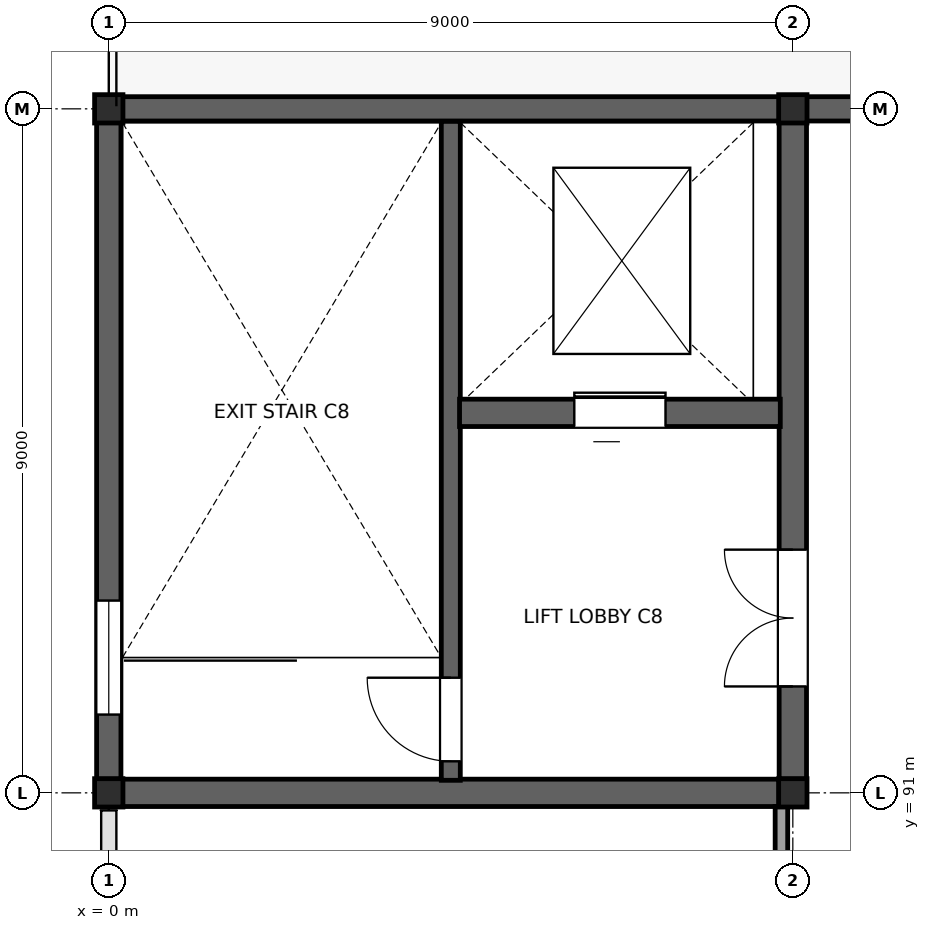
"""IFC4 building model, lengths in metres.
Left out: names, types, materials, properties, quantities, classifications, styles, units other than length and angle.
Written with IfcOpenShell. Run it as: python <this file> out.ifc"""

import sys

from ifc_helpers import new_model, si_unit, direction, frame, frame_2d, origin, origin_2d, place, context, subcontext, project, spatial, rectangle, i_section, extrude, element, fill, save


model = new_model("IFC4")
c1 = context("Model", 3, precision=1e-05, world=origin(), true_north=direction((0.0, 1.0)))
c2 = subcontext(c1, "Body", "Model", "MODEL_VIEW")
j1 = project(units=[si_unit("LENGTHUNIT", "METRE"), si_unit("PLANEANGLEUNIT", "RADIAN")], contexts=[c1])
p1 = place(None, origin())
s1 = spatial("IfcSite", under=j1, at=p1, CompositionType="ELEMENT")
p2 = place(p1, origin())
s2 = spatial("IfcBuilding", under=s1, at=p2, CompositionType="ELEMENT")
p3 = place(p2, frame((0.0, 0.0, 21.0)))
s3 = spatial("IfcBuildingStorey", under=s2, at=p3, CompositionType="ELEMENT", Elevation=21.0)
for number, where, z_axis, x_axis in (
    (1, (0.0, 91.0, 0.0), (0.0, 0.0, 1.0), (1.0, 0.0, 0.0)),
    (2, (0.0, 100.0, 0.0), (0.0, 0.0, 1.0), (1.0, 0.0, 0.0)),
    (3, (9.0, 91.0, 0.0), (0.0, 0.0, 1.0), (1.0, 0.0, 0.0)),
    (4, (9.0, 100.0, 0.0), (0.0, 0.0, 1.0), (1.0, 0.0, 0.0)),
):
    element("IfcColumn", number, at=place(p3, frame(where, z_axis=z_axis, x_axis=x_axis)), inside=s3, PredefinedType="COLUMN", context=c2, shape_type="SweptSolid", body=[
        extrude(i_section(OverallWidth=0.373, OverallDepth=0.373, WebThickness=0.016, FlangeThickness=0.026, at=origin_2d()), origin(), (0.0, 0.0, 1.0), 4.5),
    ])
p4 = place(p3, frame((0.0, 91.18, 0.0), z_axis=(0.0, 0.0, 1.0), x_axis=(0.0, 1.0, 0.0)))
e5 = element("IfcWall", 5, at=p4, inside=s3, PredefinedType="STANDARD", context=c2, shape_type="SweptSolid", body=[
    extrude(rectangle(XDim=8.64, YDim=0.32, at=frame_2d((4.32, 0.0))), origin(), (0.0, 0.0, 1.0), 4.29),
])
p5 = place(p4, frame((0.85, 0.0, 1.1)))
e6 = element("IfcOpeningElement", 6, at=p5, cuts=e5, PredefinedType="OPENING", context=c2, shape_type="SweptSolid", body=[
    extrude(rectangle(XDim=1.5, YDim=1.8, at=frame_2d((0.75, 0.9))), frame((0.0, 0.17, 0.0), z_axis=(0.0, -1.0, 0.0), x_axis=(1.0, 0.0, 0.0)), (0.0, 0.0, 1.0), 0.34),
])
for number, where, z_axis, x_axis in (
    (7, (0.015, 100.0, 0.0), (0.0, 0.0, 1.0), (1.0, 0.0, 0.0)),
    (8, (9.015, 100.0, 0.0), (0.0, 0.0, 1.0), (1.0, 0.0, 0.0)),
):
    element("IfcWall", number, at=place(p3, frame(where, z_axis=z_axis, x_axis=x_axis)), inside=s3, PredefinedType="STANDARD", context=c2, shape_type="SweptSolid", body=[
        extrude(rectangle(XDim=8.97, YDim=0.32, at=frame_2d((4.485, 0.0))), origin(), (0.0, 0.0, 1.0), 4.29),
    ])
p6 = place(p3, frame((9.0, 91.181, 0.0), z_axis=(0.0, 0.0, 1.0), x_axis=(0.0, 1.0, 0.0)))
e9 = element("IfcWall", 9, at=p6, inside=s3, PredefinedType="SHEAR", context=c2, shape_type="SweptSolid", body=[
    extrude(rectangle(XDim=8.638, YDim=0.36, at=frame_2d((4.319, 0.0))), origin(), (0.0, 0.0, 1.0), 4.29),
])
p7 = place(p6, frame((1.219, 0.0, 0.0)))
e10 = element("IfcOpeningElement", 10, at=p7, cuts=e9, PredefinedType="OPENING", context=c2, shape_type="SweptSolid", body=[
    extrude(rectangle(XDim=1.8, YDim=2.3, at=frame_2d((0.9, 1.15))), frame((0.0, 0.19, 0.0), z_axis=(0.0, -1.0, 0.0), x_axis=(1.0, 0.0, 0.0)), (0.0, 0.0, 1.0), 0.38),
])
p8 = place(p3, frame((0.181, 91.0, 0.0), z_axis=(0.0, 0.0, 1.0), x_axis=(1.0, 0.0, 0.0)))
e11 = element("IfcWall", 11, at=p8, inside=s3, PredefinedType="SHEAR", context=c2, shape_type="SweptSolid", body=[
    extrude(rectangle(XDim=8.638, YDim=0.36, at=frame_2d((4.319, 0.0))), origin(), (0.0, 0.0, 1.0), 4.29),
])
p9 = place(p3, frame((4.5, 91.165, 0.0), z_axis=(0.0, 0.0, 1.0), x_axis=(0.0, 1.0, 0.0)))
e12 = element("IfcWall", 12, at=p9, inside=s3, PredefinedType="SHEAR", context=c2, shape_type="SweptSolid", body=[
    extrude(rectangle(XDim=8.67, YDim=0.25, at=frame_2d((4.335, 0.0))), origin(), (0.0, 0.0, 1.0), 4.29),
])
p10 = place(p9, frame((0.25, 0.0, 0.0)))
e13 = element("IfcOpeningElement", 13, at=p10, cuts=e12, PredefinedType="OPENING", context=c2, shape_type="SweptSolid", body=[
    extrude(rectangle(XDim=1.1, YDim=2.2, at=frame_2d((0.55, 1.1))), frame((0.0, 0.135, 0.0), z_axis=(0.0, -1.0, 0.0), x_axis=(1.0, 0.0, 0.0)), (0.0, 0.0, 1.0), 0.27),
])
p11 = place(p3, frame((4.615, 96.0, 0.0), z_axis=(0.0, 0.0, 1.0), x_axis=(1.0, 0.0, 0.0)))
e14 = element("IfcWall", 14, at=p11, inside=s3, PredefinedType="SHEAR", context=c2, shape_type="SweptSolid", body=[
    extrude(rectangle(XDim=4.22, YDim=0.36, at=frame_2d((2.11, 0.0))), origin(), (0.0, 0.0, 1.0), 4.29),
])
p12 = place(p11, frame((1.51, 0.0, 0.0)))
e15 = element("IfcOpeningElement", 15, at=p12, cuts=e14, PredefinedType="OPENING", context=c2, shape_type="SweptSolid", body=[
    extrude(rectangle(XDim=1.2, YDim=2.3, at=frame_2d((0.6, 1.15))), frame((0.0, 0.19, 0.0), z_axis=(0.0, -1.0, 0.0), x_axis=(1.0, 0.0, 0.0)), (0.0, 0.0, 1.0), 0.38),
])
p13 = place(p3, frame((8.85, 63.78, 0.0), z_axis=(0.0, 0.0, 1.0), x_axis=(0.0, 1.0, 0.0)))
e16 = element("IfcWall", 16, at=p13, inside=s3, PredefinedType="PARTITIONING", context=c2, shape_type="SweptSolid", body=[
    extrude(rectangle(XDim=27.04, YDim=0.165, at=frame_2d((13.52, 0.0))), origin(), (0.0, 0.0, 1.0), 3.5),
])
p14 = place(p13, frame((2.72, 0.0, 0.0)))
e17 = element("IfcOpeningElement", 17, at=p14, cuts=e16, PredefinedType="OPENING", context=c2, shape_type="SweptSolid", body=[
    extrude(rectangle(XDim=0.98, YDim=2.15, at=frame_2d((0.49, 1.075))), frame((0.0, 0.093, 0.0), z_axis=(0.0, -1.0, 0.0), x_axis=(1.0, 0.0, 0.0)), (0.0, 0.0, 1.0), 0.185),
])
p15 = place(p13, frame((5.52, 0.0, 0.0)))
e18 = element("IfcOpeningElement", 18, at=p15, cuts=e16, PredefinedType="OPENING", context=c2, shape_type="SweptSolid", body=[
    extrude(rectangle(XDim=1.02, YDim=2.16, at=frame_2d((0.51, 1.08))), frame((0.0, 0.093, 0.0), z_axis=(0.0, -1.0, 0.0), x_axis=(1.0, 0.0, 0.0)), (0.0, 0.0, 1.0), 0.185),
])
p16 = place(p13, frame((13.72, 0.0, 0.0)))
e19 = element("IfcOpeningElement", 19, at=p16, cuts=e16, PredefinedType="OPENING", context=c2, shape_type="SweptSolid", body=[
    extrude(rectangle(XDim=0.95, YDim=2.12, at=frame_2d((0.475, 1.06))), frame((0.0, 0.093, 0.0), z_axis=(0.0, -1.0, 0.0), x_axis=(1.0, 0.0, 0.0)), (0.0, 0.0, 1.0), 0.185),
])
p17 = place(p13, frame((21.72, 0.0, 0.0)))
e20 = element("IfcOpeningElement", 20, at=p17, cuts=e16, PredefinedType="OPENING", context=c2, shape_type="SweptSolid", body=[
    extrude(rectangle(XDim=0.92, YDim=2.1, at=frame_2d((0.46, 1.05))), frame((0.0, 0.093, 0.0), z_axis=(0.0, -1.0, 0.0), x_axis=(1.0, 0.0, 0.0)), (0.0, 0.0, 1.0), 0.185),
])
p18 = place(p5, origin())
e21 = element("IfcWindow", 21, at=p18, inside=s3, PartitioningType="SINGLE_PANEL", PredefinedType="WINDOW", context=c2, shape_type="SweptSolid", body=[
    extrude(rectangle(XDim=1.5, YDim=1.8, at=frame_2d((0.75, 0.9))), frame((0.0, 0.03, 0.0), z_axis=(0.0, -1.0, 0.0), x_axis=(1.0, 0.0, 0.0)), (0.0, 0.0, 1.0), 0.06),
])
fill(e6, e21)
p19 = place(p10, origin())
e22 = element("IfcDoor", 22, at=p19, inside=s3, OperationType="SINGLE_SWING_RIGHT", PredefinedType="DOOR", context=c2, shape_type="SweptSolid", body=[
    extrude(rectangle(XDim=1.1, YDim=2.2, at=frame_2d((0.55, 1.1))), frame((0.0, 0.025, 0.0), z_axis=(0.0, -1.0, 0.0), x_axis=(1.0, 0.0, 0.0)), (0.0, 0.0, 1.0), 0.05),
])
fill(e13, e22)
p20 = place(p12, origin())
e23 = element("IfcDoor", 23, at=p20, inside=s3, OperationType="SLIDING_TO_LEFT", PredefinedType="DOOR", context=c2, shape_type="SweptSolid", body=[
    extrude(rectangle(XDim=1.2, YDim=2.3, at=frame_2d((0.6, 1.15))), frame((0.0, 0.025, 0.0), z_axis=(0.0, -1.0, 0.0), x_axis=(1.0, 0.0, 0.0)), (0.0, 0.0, 1.0), 0.05),
])
fill(e15, e23)
p21 = place(p7, origin())
e24 = element("IfcDoor", 24, at=p21, inside=s3, OperationType="DOUBLE_DOOR_SINGLE_SWING", PredefinedType="DOOR", context=c2, shape_type="SweptSolid", body=[
    extrude(rectangle(XDim=1.8, YDim=2.3, at=frame_2d((0.9, 1.15))), frame((0.0, 0.025, 0.0), z_axis=(0.0, -1.0, 0.0), x_axis=(1.0, 0.0, 0.0)), (0.0, 0.0, 1.0), 0.05),
])
fill(e10, e24)
save(model, sys.argv[1])
